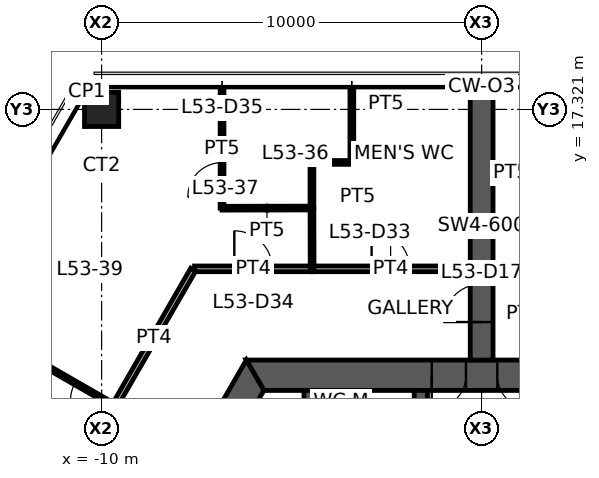
"""IFC4 building model, lengths in metres.
Left out: names, types, materials, properties, quantities, classifications, styles, units other than length and angle.
Written with IfcOpenShell. Run it as: python <this file> out.ifc"""

import sys

from ifc_helpers import new_model, si_unit, direction, frame, frame_2d, origin, origin_2d, place, context, subcontext, project, spatial, polyline, rectangle, hollow_rectangle, outline, extrude, element, fill, save


model = new_model("IFC4")
c1 = context("Model", 3, precision=1e-05, world=origin(), true_north=direction((0.0, 1.0)))
c2 = subcontext(c1, "Body", "Model", "MODEL_VIEW")
j1 = project(units=[si_unit("LENGTHUNIT", "METRE"), si_unit("PLANEANGLEUNIT", "RADIAN")], contexts=[c1])
p1 = place(None, origin())
s1 = spatial("IfcSite", under=j1, at=p1, CompositionType="ELEMENT")
p2 = place(p1, origin())
s2 = spatial("IfcBuilding", under=s1, at=p2, CompositionType="ELEMENT")
p3 = place(p2, frame((0.0, 0.0, 212.8)))
s3 = spatial("IfcBuildingStorey", under=s2, at=p3, CompositionType="ELEMENT", Elevation=212.8)
p4 = place(p3, frame((-10.0, 17.321, 0.0), z_axis=(0.0, 0.0, 1.0), x_axis=(1.0, 0.0, 0.0)))
e1 = element("IfcColumn", 1, at=p4, inside=s3, PredefinedType="COLUMN", context=c2, shape_type="SweptSolid", body=[
    extrude(hollow_rectangle(XDim=0.9, YDim=0.9, WallThickness=0.09, at=origin_2d()), origin(), (0.0, 0.0, 1.0), 3.9),
])
p5 = place(p3, frame((5.961, 10.325, 0.0), z_axis=(0.0, 0.0, 1.0), x_axis=(-1.0, 0.0, 0.0)))
e2 = element("IfcWall", 2, at=p5, inside=s3, PredefinedType="SHEAR", context=c2, shape_type="SweptSolid", body=[
    extrude(outline(polyline([(-0.231, -0.4), (4.649, -0.4), (5.549, -0.4), (6.374, -0.4), (7.273, -0.4), (12.153, -0.4), (11.691, 0.4), (7.273, 0.4), (6.374, 0.4), (5.549, 0.4), (4.649, 0.4), (0.231, 0.4), (-0.231, -0.4)])), origin(), (0.0, 0.0, 1.0), 3.9),
])
p6 = place(p5, frame((6.374, 0.0, 0.0)))
e3 = element("IfcOpeningElement", 3, at=p6, cuts=e2, PredefinedType="OPENING", context=c2, shape_type="SweptSolid", body=[
    extrude(rectangle(XDim=0.9, YDim=2.1, at=frame_2d((0.45, 1.05))), frame((0.0, 0.41, 0.0), z_axis=(0.0, -1.0, 0.0), x_axis=(1.0, 0.0, 0.0)), (0.0, 0.0, 1.0), 0.82),
])
p7 = place(p5, frame((4.649, 0.0, 0.0)))
e4 = element("IfcOpeningElement", 4, at=p7, cuts=e2, PredefinedType="OPENING", context=c2, shape_type="SweptSolid", body=[
    extrude(rectangle(XDim=0.9, YDim=2.1, at=frame_2d((0.45, 1.05))), frame((0.0, 0.41, 0.0), z_axis=(0.0, -1.0, 0.0), x_axis=(1.0, 0.0, 0.0)), (0.0, 0.0, 1.0), 0.82),
])
p8 = place(p3, frame((-5.961, 10.325, 0.0), z_axis=(0.0, 0.0, 1.0), x_axis=(-0.500004296715, -0.866022923061, 0.0)))
e5 = element("IfcWall", 5, at=p8, inside=s3, PredefinedType="SHEAR", context=c2, shape_type="SweptSolid", body=[
    extrude(outline(polyline([(-0.231, -0.4), (4.494, -0.4), (5.494, -0.4), (12.153, -0.4), (11.691, 0.4), (5.494, 0.4), (4.494, 0.4), (0.231, 0.4), (-0.231, -0.4)])), origin(), (0.0, 0.0, 1.0), 3.9),
])
p9 = place(p8, frame((4.494, 0.0, 0.0)))
e6 = element("IfcOpeningElement", 6, at=p9, cuts=e5, PredefinedType="OPENING", context=c2, shape_type="SweptSolid", body=[
    extrude(rectangle(XDim=1.0, YDim=2.1, at=frame_2d((0.5, 1.05))), frame((0.0, 0.41, 0.0), z_axis=(0.0, -1.0, 0.0), x_axis=(1.0, 0.0, 0.0)), (0.0, 0.0, 1.0), 0.82),
])
p10 = place(p3, frame((0.0, 10.725, 0.0), z_axis=(0.0, 0.0, 1.0), x_axis=(0.0, 1.0, 0.0)))
e7 = element("IfcWall", 7, at=p10, inside=s3, PredefinedType="SHEAR", context=c2, shape_type="SweptSolid", body=[
    extrude(rectangle(XDim=7.045, YDim=0.6, at=frame_2d((3.523, 0.0))), origin(), (0.0, 0.0, 1.0), 3.9),
])
p11 = place(p10, frame((1.0, 0.0, 0.0)))
e8 = element("IfcOpeningElement", 8, at=p11, cuts=e7, PredefinedType="OPENING", context=c2, shape_type="SweptSolid", body=[
    extrude(rectangle(XDim=1.0, YDim=2.1, at=frame_2d((0.5, 1.05))), frame((0.0, 0.31, 0.0), z_axis=(0.0, -1.0, 0.0), x_axis=(1.0, 0.0, 0.0)), (0.0, 0.0, 1.0), 0.62),
])
p12 = place(p3, frame((-1.6, 3.775, 0.0), z_axis=(0.0, 0.0, 1.0), x_axis=(0.0, 1.0, 0.0)))
e9 = element("IfcWall", 9, at=p12, inside=s3, PredefinedType="SHEAR", context=c2, shape_type="SweptSolid", body=[
    extrude(rectangle(XDim=6.15, YDim=0.35, at=frame_2d((3.075, 0.0))), origin(), (0.0, 0.0, 1.0), 3.9),
])
p13 = place(p12, frame((3.775, 0.0, 0.0)))
e10 = element("IfcOpeningElement", 10, at=p13, cuts=e9, PredefinedType="OPENING", context=c2, shape_type="SweptSolid", body=[
    extrude(rectangle(XDim=0.9, YDim=2.1, at=frame_2d((0.45, 1.05))), frame((0.0, 0.185, 0.0), z_axis=(0.0, -1.0, 0.0), x_axis=(1.0, 0.0, 0.0)), (0.0, 0.0, 1.0), 0.37),
])
p14 = place(p3, frame((-4.5, 3.775, 0.0), z_axis=(0.0, 0.0, 1.0), x_axis=(0.0, 1.0, 0.0)))
e11 = element("IfcWall", 11, at=p14, inside=s3, PredefinedType="SHEAR", context=c2, shape_type="SweptSolid", body=[
    extrude(rectangle(XDim=6.15, YDim=0.35, at=frame_2d((3.075, 0.0))), origin(), (0.0, 0.0, 1.0), 3.9),
])
p15 = place(p3, frame((-3.025, 6.575, 0.0), z_axis=(0.0, 0.0, 1.0), x_axis=(0.0, 1.0, 0.0)))
e12 = element("IfcWall", 12, at=p15, inside=s3, PredefinedType="PARTITIONING", context=c2, shape_type="SweptSolid", body=[
    extrude(rectangle(XDim=3.35, YDim=0.1, at=frame_2d((1.675, 0.0))), origin(), (0.0, 0.0, 1.0), 2.95),
])
p16 = place(p15, frame((2.0, 0.0, 0.0)))
e13 = element("IfcOpeningElement", 13, at=p16, cuts=e12, PredefinedType="OPENING", context=c2, shape_type="SweptSolid", body=[
    extrude(rectangle(XDim=0.9, YDim=2.1, at=frame_2d((0.45, 1.05))), frame((0.0, 0.06, 0.0), z_axis=(0.0, -1.0, 0.0), x_axis=(1.0, 0.0, 0.0)), (0.0, 0.0, 1.0), 0.12),
])
p17 = place(p15, frame((0.4, 0.0, 0.0)))
e14 = element("IfcOpeningElement", 14, at=p17, cuts=e12, PredefinedType="OPENING", context=c2, shape_type="SweptSolid", body=[
    extrude(rectangle(XDim=0.9, YDim=2.1, at=frame_2d((0.45, 1.05))), frame((0.0, 0.06, 0.0), z_axis=(0.0, -1.0, 0.0), x_axis=(1.0, 0.0, 0.0)), (0.0, 0.0, 1.0), 0.12),
])
p18 = place(p3, frame((0.32, 13.125, 0.0), z_axis=(0.0, 0.0, 1.0), x_axis=(1.0, 0.0, 0.0)))
e15 = element("IfcWall", 15, at=p18, inside=s3, PredefinedType="PARTITIONING", context=c2, shape_type="SweptSolid", body=[
    extrude(rectangle(XDim=1.585, YDim=0.15, at=frame_2d((0.792, 0.0))), origin(), (0.0, 0.0, 1.0), 2.95),
])
p19 = place(p3, frame((-4.47, 13.125, 0.0), z_axis=(0.0, 0.0, 1.0), x_axis=(1.0, 0.0, 0.0)))
e16 = element("IfcWall", 16, at=p19, inside=s3, PredefinedType="PARTITIONING", context=c2, shape_type="SweptSolid", body=[
    extrude(rectangle(XDim=4.15, YDim=0.15, at=frame_2d((2.075, 0.0))), origin(), (0.0, 0.0, 1.0), 2.95),
])
p20 = place(p19, frame((1.575, 0.0, 0.0)))
e17 = element("IfcOpeningElement", 17, at=p20, cuts=e16, PredefinedType="OPENING", context=c2, shape_type="SweptSolid", body=[
    extrude(rectangle(XDim=1.0, YDim=2.1, at=frame_2d((0.5, 1.05))), frame((0.0, 0.085, 0.0), z_axis=(0.0, -1.0, 0.0), x_axis=(1.0, 0.0, 0.0)), (0.0, 0.0, 1.0), 0.17),
])
p21 = place(p3, frame((-7.555, 13.125, 0.0), z_axis=(0.0, 0.0, 1.0), x_axis=(1.0, 0.0, 0.0)))
e18 = element("IfcWall", 18, at=p21, inside=s3, PredefinedType="PARTITIONING", context=c2, shape_type="SweptSolid", body=[
    extrude(rectangle(XDim=3.094, YDim=0.15, at=frame_2d((1.547, 0.0))), origin(), (0.0, 0.0, 1.0), 2.95),
])
p22 = place(p21, frame((1.047, 0.0, 0.0)))
e19 = element("IfcOpeningElement", 19, at=p22, cuts=e18, PredefinedType="OPENING", context=c2, shape_type="SweptSolid", body=[
    extrude(rectangle(XDim=1.0, YDim=2.1, at=frame_2d((0.5, 1.05))), frame((0.0, 0.085, 0.0), z_axis=(0.0, -1.0, 0.0), x_axis=(1.0, 0.0, 0.0)), (0.0, 0.0, 1.0), 0.17),
])
p23 = place(p3, frame((-4.465, 14.716, 0.0), z_axis=(0.0, 0.0, 1.0), x_axis=(0.0, 1.0, 0.0)))
e20 = element("IfcWall", 20, at=p23, inside=s3, PredefinedType="PARTITIONING", context=c2, shape_type="SweptSolid", body=[
    extrude(rectangle(XDim=1.209, YDim=0.1, at=frame_2d((0.605, 0.0))), origin(), (0.0, 0.0, 1.0), 2.95),
])
p24 = place(p3, frame((-4.465, 15.925, 0.0), z_axis=(0.0, 0.0, 1.0), x_axis=(1.0, 0.0, 0.0)))
e21 = element("IfcWall", 21, at=p24, inside=s3, PredefinedType="PARTITIONING", context=c2, shape_type="SweptSolid", body=[
    extrude(rectangle(XDim=1.05, YDim=0.1, at=frame_2d((0.525, 0.0))), origin(), (0.0, 0.0, 1.0), 2.95),
])
p25 = place(p3, frame((-3.415, 15.925, 0.0), z_axis=(0.0, 0.0, 1.0), x_axis=(-0.000130174433, 0.999999991527, 0.0)))
e22 = element("IfcWall", 22, at=p25, inside=s3, PredefinedType="PARTITIONING", context=c2, shape_type="SweptSolid", body=[
    extrude(rectangle(XDim=1.875, YDim=0.1, at=frame_2d((0.938, 0.0))), origin(), (0.0, 0.0, 1.0), 2.95),
])
p26 = place(p3, frame((-4.46, 13.125, 0.0), z_axis=(0.0, 0.0, 1.0), x_axis=(-0.0028989808, 0.999995797946, 0.0)))
e23 = element("IfcWall", 23, at=p26, inside=s3, PredefinedType="PARTITIONING", context=c2, shape_type="SweptSolid", body=[
    extrude(rectangle(XDim=1.6, YDim=0.1, at=frame_2d((0.8, 0.0))), origin(), (0.0, 0.0, 1.0), 2.95),
])
p27 = place(p3, frame((-6.831, 14.72, 0.0), z_axis=(0.0, 0.0, 1.0), x_axis=(0.0, 1.0, 0.0)))
e24 = element("IfcWall", 24, at=p27, inside=s3, PredefinedType="PARTITIONING", context=c2, shape_type="SweptSolid", body=[
    extrude(rectangle(XDim=3.135, YDim=0.1, at=frame_2d((1.567, 0.0))), origin(), (0.0, 0.0, 1.0), 2.95),
])
p28 = place(p27, frame((0.3, 0.0, 0.0)))
e25 = element("IfcOpeningElement", 25, at=p28, cuts=e24, PredefinedType="OPENING", context=c2, shape_type="SweptSolid", body=[
    extrude(rectangle(XDim=0.9, YDim=2.1, at=frame_2d((0.45, 1.05))), frame((0.0, 0.06, 0.0), z_axis=(0.0, -1.0, 0.0), x_axis=(1.0, 0.0, 0.0)), (0.0, 0.0, 1.0), 0.12),
])
p29 = place(p3, frame((-4.465, 14.725, 0.0), z_axis=(0.0, 0.0, 1.0), x_axis=(-0.999998077668, -0.001960780544, 0.0)))
e26 = element("IfcWall", 26, at=p29, inside=s3, PredefinedType="PARTITIONING", context=c2, shape_type="SweptSolid", body=[
    extrude(rectangle(XDim=2.366, YDim=0.1, at=frame_2d((1.183, 0.0))), origin(), (0.0, 0.0, 1.0), 2.95),
])
p30 = place(p3, frame((-9.661, 9.516, 0.0), z_axis=(0.0, 0.0, 1.0), x_axis=(0.499997836828, 0.866026652689, 0.0)))
e27 = element("IfcWall", 27, at=p30, inside=s3, PredefinedType="PARTITIONING", context=c2, shape_type="SweptSolid", body=[
    extrude(rectangle(XDim=4.144, YDim=0.15, at=frame_2d((2.072, 0.0))), origin(), (0.0, 0.0, 1.0), 2.95),
])
p31 = place(p3, frame((-9.656, 9.524, 0.0), z_axis=(0.0, 0.0, 1.0), x_axis=(-0.866526579402, 0.499130931911, 0.0)))
e28 = element("IfcWall", 28, at=p31, inside=s3, PredefinedType="PARTITIONING", context=c2, shape_type="SweptSolid", body=[
    extrude(rectangle(XDim=4.705, YDim=0.1, at=frame_2d((2.353, 0.0))), origin(), (0.0, 0.0, 1.0), 2.95),
])
p32 = place(p31, frame((0.3, 0.0, 0.0)))
e29 = element("IfcOpeningElement", 29, at=p32, cuts=e28, PredefinedType="OPENING", context=c2, shape_type="SweptSolid", body=[
    extrude(rectangle(XDim=0.9, YDim=2.1, at=frame_2d((0.45, 1.05))), frame((0.0, 0.06, 0.0), z_axis=(0.0, -1.0, 0.0), x_axis=(1.0, 0.0, 0.0)), (0.0, 0.0, 1.0), 0.12),
])
p33 = place(p3, frame((0.0, 17.771, 0.0), z_axis=(0.0, 0.0, 1.0), x_axis=(0.0, 1.0, 0.0)))
e30 = element("IfcWall", 30, at=p33, inside=s3, PredefinedType="PARTITIONING", context=c2, shape_type="SweptSolid", body=[
    extrude(rectangle(XDim=0.085, YDim=0.175, at=frame_2d((0.042, 0.0))), origin(), (0.0, 0.0, 1.0), 3.9),
])
p34 = place(p6, origin())
e31 = element("IfcDoor", 31, at=p34, inside=s3, OperationType="SINGLE_SWING_RIGHT", PredefinedType="DOOR", context=c2, shape_type="SweptSolid", body=[
    extrude(rectangle(XDim=0.9, YDim=2.1, at=frame_2d((0.45, 1.05))), frame((0.0, 0.025, 0.0), z_axis=(0.0, -1.0, 0.0), x_axis=(1.0, 0.0, 0.0)), (0.0, 0.0, 1.0), 0.05),
])
fill(e3, e31)
p35 = place(p7, origin())
e32 = element("IfcDoor", 32, at=p35, inside=s3, OperationType="SINGLE_SWING_LEFT", PredefinedType="DOOR", context=c2, shape_type="SweptSolid", body=[
    extrude(rectangle(XDim=0.9, YDim=2.1, at=frame_2d((0.45, 1.05))), frame((0.0, 0.025, 0.0), z_axis=(0.0, -1.0, 0.0), x_axis=(1.0, 0.0, 0.0)), (0.0, 0.0, 1.0), 0.05),
])
fill(e4, e32)
p36 = place(p11, origin())
e33 = element("IfcDoor", 33, at=p36, inside=s3, OperationType="SINGLE_SWING_LEFT", PredefinedType="DOOR", context=c2, shape_type="SweptSolid", body=[
    extrude(rectangle(XDim=1.0, YDim=2.1, at=frame_2d((0.5, 1.05))), frame((0.0, 0.025, 0.0), z_axis=(0.0, -1.0, 0.0), x_axis=(1.0, 0.0, 0.0)), (0.0, 0.0, 1.0), 0.05),
])
fill(e8, e33)
p37 = place(p20, origin())
e34 = element("IfcDoor", 34, at=p37, inside=s3, OperationType="SINGLE_SWING_LEFT", PredefinedType="DOOR", context=c2, shape_type="SweptSolid", body=[
    extrude(rectangle(XDim=1.0, YDim=2.1, at=frame_2d((0.5, 1.05))), frame((0.0, 0.025, 0.0), z_axis=(0.0, -1.0, 0.0), x_axis=(1.0, 0.0, 0.0)), (0.0, 0.0, 1.0), 0.05),
])
fill(e17, e34)
p38 = place(p22, origin())
e35 = element("IfcDoor", 35, at=p38, inside=s3, OperationType="SINGLE_SWING_LEFT", PredefinedType="DOOR", context=c2, shape_type="SweptSolid", body=[
    extrude(rectangle(XDim=1.0, YDim=2.1, at=frame_2d((0.5, 1.05))), frame((0.0, 0.025, 0.0), z_axis=(0.0, -1.0, 0.0), x_axis=(1.0, 0.0, 0.0)), (0.0, 0.0, 1.0), 0.05),
])
fill(e19, e35)
p39 = place(p28, origin())
e36 = element("IfcDoor", 36, at=p39, inside=s3, OperationType="SINGLE_SWING_LEFT", PredefinedType="DOOR", context=c2, shape_type="SweptSolid", body=[
    extrude(rectangle(XDim=0.9, YDim=2.1, at=frame_2d((0.45, 1.05))), frame((0.0, 0.025, 0.0), z_axis=(0.0, -1.0, 0.0), x_axis=(1.0, 0.0, 0.0)), (0.0, 0.0, 1.0), 0.05),
])
fill(e25, e36)
p40 = place(p32, origin())
e37 = element("IfcDoor", 37, at=p40, inside=s3, OperationType="SINGLE_SWING_LEFT", PredefinedType="DOOR", context=c2, shape_type="SweptSolid", body=[
    extrude(rectangle(XDim=0.9, YDim=2.1, at=frame_2d((0.45, 1.05))), frame((0.0, 0.025, 0.0), z_axis=(0.0, -1.0, 0.0), x_axis=(1.0, 0.0, 0.0)), (0.0, 0.0, 1.0), 0.05),
])
fill(e29, e37)
save(model, sys.argv[1])
